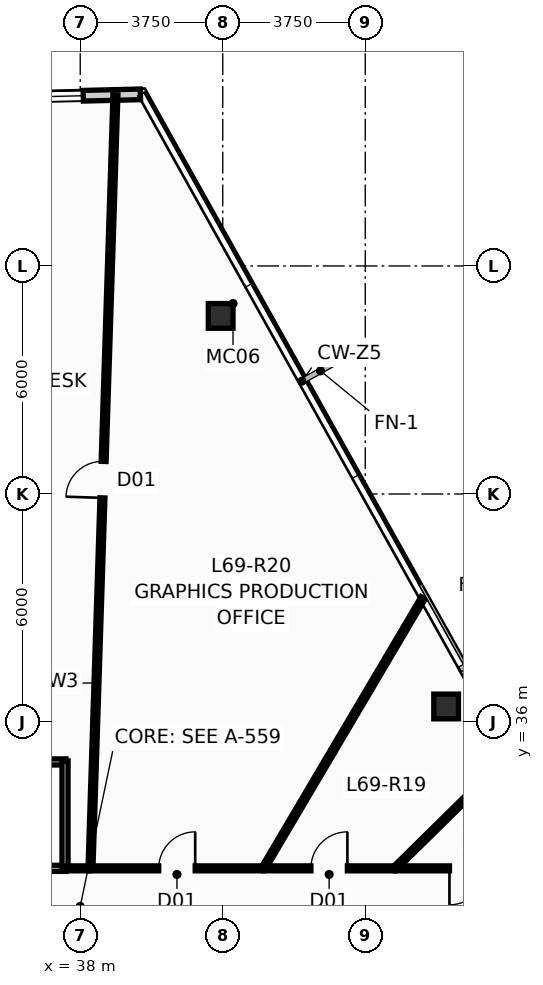
"""IFC4 building model, lengths in metres.
Left out: names, types, materials, properties, quantities, classifications, styles, units other than length and angle.
Written with IfcOpenShell. Run it as: python <this file> out.ifc"""

import sys

from ifc_helpers import new_model, si_unit, direction, frame, frame_2d, origin, origin_2d, place, context, subcontext, project, spatial, rectangle, hollow_rectangle, extrude, source, transform, mapped, element, fill, save


model = new_model("IFC4")
c1 = context("Model", 3, precision=1e-05, world=origin(), true_north=direction((0.0, 1.0)))
c2 = subcontext(c1, "Body", "Model", "MODEL_VIEW")
j1 = project(units=[si_unit("LENGTHUNIT", "METRE"), si_unit("PLANEANGLEUNIT", "RADIAN")], contexts=[c1])
p1 = place(None, origin())
s1 = spatial("IfcSite", under=j1, at=p1, CompositionType="ELEMENT")
p2 = place(p1, origin())
s2 = spatial("IfcBuilding", under=s1, at=p2, CompositionType="ELEMENT")
p3 = place(p2, frame((0.0, 0.0, 262.7)))
s3 = spatial("IfcBuildingStorey", under=s2, at=p3, CompositionType="ELEMENT", Elevation=262.7)
m1 = source(origin(), c2, "Body", "SweptSolid", [
    extrude(hollow_rectangle(XDim=0.65, YDim=0.65, WallThickness=0.04, at=origin_2d()), origin(), (0.0, 0.0, 1.0), 3.651),
])
p4 = place(p3, frame((41.696, 46.686, 0.0), z_axis=(-0.023871161178, 0.00173851594, 0.999713531581), x_axis=(-0.07263675076, -0.997358462359, 0.0)))
e1 = element("IfcColumn", 1, at=p4, inside=s3, PredefinedType="COLUMN", context=c2, shape_type="MappedRepresentation", body=[
    mapped(m1, transform((0.0, 0.0, 0.0), scale=1.0)),
])
m2 = source(origin(), c2, "Body", "SweptSolid", [
    extrude(hollow_rectangle(XDim=0.65, YDim=0.65, WallThickness=0.04, at=origin_2d()), origin(), (0.0, 0.0, 1.0), 3.651),
])
p5 = place(p3, frame((47.628, 36.41, 0.0), z_axis=(-0.01939269685, -0.00601842316, 0.999793829693), x_axis=(0.296399214872, -0.955064136811, 0.0)))
e2 = element("IfcColumn", 2, at=p5, inside=s3, PredefinedType="COLUMN", context=c2, shape_type="MappedRepresentation", body=[
    mapped(m2, transform((0.0, 0.0, 0.0), scale=1.0)),
])
p6 = place(p3, frame((36.27, 52.436, 0.0), z_axis=(0.0, 0.0, 1.0), x_axis=(0.999711728511, 0.024009578864, 0.0)))
e3 = element("IfcWall", 3, at=p6, inside=s3, PredefinedType="STANDARD", context=c2, shape_type="SweptSolid", body=[
    extrude(rectangle(XDim=3.315, YDim=0.28, at=frame_2d((1.657, 0.0))), origin(), (0.0, 0.0, 1.0), 3.4),
])
p7 = place(p6, frame((0.61, 0.0, 0.9)))
e4 = element("IfcOpeningElement", 4, at=p7, cuts=e3, PredefinedType="OPENING", context=c2, shape_type="SweptSolid", body=[
    extrude(rectangle(XDim=1.2, YDim=1.65, at=frame_2d((0.6, 0.825))), frame((0.0, 0.152, 0.0), z_axis=(0.0, -1.0, 0.0), x_axis=(1.0, 0.0, 0.0)), (0.0, 0.0, 1.0), 0.304),
])
p8 = place(p3, frame((34.575, 32.15, 0.0), z_axis=(0.0, 0.0, 1.0), x_axis=(1.0, 0.0, 0.0)))
e5 = element("IfcWall", 5, at=p8, inside=s3, PredefinedType="PLUMBINGWALL", context=c2, shape_type="SweptSolid", body=[
    extrude(rectangle(XDim=3.05, YDim=0.16, at=frame_2d((1.525, 0.0))), origin(), (0.0, 0.0, 1.0), 3.085),
])
p9 = place(p8, frame((1.035, 0.0, 0.0)))
e6 = element("IfcOpeningElement", 6, at=p9, cuts=e5, PredefinedType="OPENING", context=c2, shape_type="SweptSolid", body=[
    extrude(rectangle(XDim=0.92, YDim=2.1, at=frame_2d((0.46, 1.05))), frame((0.0, 0.092, 0.0), z_axis=(0.0, -1.0, 0.0), x_axis=(1.0, 0.0, 0.0)), (0.0, 0.0, 1.0), 0.184),
])
p10 = place(p3, frame((37.625, 34.95, 0.0), z_axis=(0.0, 0.0, 1.0), x_axis=(-1.0, 0.0, 0.0)))
e7 = element("IfcWall", 7, at=p10, inside=s3, PredefinedType="PLUMBINGWALL", context=c2, shape_type="SweptSolid", body=[
    extrude(rectangle(XDim=3.05, YDim=0.16, at=frame_2d((1.525, 0.0))), origin(), (0.0, 0.0, 1.0), 3.085),
])
p11 = place(p3, frame((37.6, 32.125, 0.0), z_axis=(0.0, 0.0, 1.0), x_axis=(0.0, 1.0, 0.0)))
e8 = element("IfcWall", 8, at=p11, inside=s3, PredefinedType="PLUMBINGWALL", context=c2, shape_type="SweptSolid", body=[
    extrude(rectangle(XDim=2.85, YDim=0.16, at=frame_2d((1.425, 0.0))), origin(), (0.0, 0.0, 1.0), 3.4),
])
p12 = place(p3, frame((38.27, 32.155, 0.0), z_axis=(0.0, 0.0, 1.0), x_axis=(0.032268342776, 0.999479241433, 0.0)))
e9 = element("IfcWall", 9, at=p12, inside=s3, PredefinedType="PARTITIONING", context=c2, shape_type="SweptSolid", body=[
    extrude(rectangle(XDim=20.36, YDim=0.13, at=frame_2d((10.18, 0.0))), origin(), (0.0, 0.0, 1.0), 3.4),
])
p13 = place(p12, frame((9.748, 0.0, 0.0)))
e10 = element("IfcOpeningElement", 10, at=p13, cuts=e9, PredefinedType="OPENING", context=c2, shape_type="SweptSolid", body=[
    extrude(rectangle(XDim=0.96, YDim=2.15, at=frame_2d((0.48, 1.075))), frame((0.0, 0.077, 0.0), z_axis=(0.0, -1.0, 0.0), x_axis=(1.0, 0.0, 0.0)), (0.0, 0.0, 1.0), 0.154),
])
p14 = place(p3, frame((42.823, 32.154, 0.0), z_axis=(0.0, 0.0, 1.0), x_axis=(0.508624754374, 0.860988303775, 0.0)))
e11 = element("IfcWall", 11, at=p14, inside=s3, PredefinedType="PARTITIONING", context=c2, shape_type="SweptSolid", body=[
    extrude(rectangle(XDim=8.26, YDim=0.13, at=frame_2d((4.13, 0.0))), origin(), (0.0, 0.0, 1.0), 3.4),
])
p15 = place(p3, frame((38.275, 32.15, 0.0), z_axis=(0.0, 0.0, 1.0), x_axis=(1.0, 0.0, 0.0)))
e12 = element("IfcWall", 12, at=p15, inside=s3, PredefinedType="PARTITIONING", context=c2, shape_type="SweptSolid", body=[
    extrude(rectangle(XDim=4.54, YDim=0.13, at=frame_2d((2.27, 0.0))), origin(), (0.0, 0.0, 1.0), 3.085),
])
p16 = place(p15, frame((1.79, 0.0, 0.0)))
e13 = element("IfcOpeningElement", 13, at=p16, cuts=e12, PredefinedType="OPENING", context=c2, shape_type="SweptSolid", body=[
    extrude(rectangle(XDim=0.96, YDim=2.15, at=frame_2d((0.48, 1.075))), frame((0.0, 0.077, 0.0), z_axis=(0.0, -1.0, 0.0), x_axis=(1.0, 0.0, 0.0)), (0.0, 0.0, 1.0), 0.154),
])
p17 = place(p3, frame((46.284, 32.154, 0.0), z_axis=(0.0, 0.0, 1.0), x_axis=(0.712832058729, 0.70133476746, 0.0)))
e14 = element("IfcWall", 14, at=p17, inside=s3, PredefinedType="PARTITIONING", context=c2, shape_type="SweptSolid", body=[
    extrude(rectangle(XDim=4.268, YDim=0.13, at=frame_2d((2.134, 0.0))), origin(), (0.0, 0.0, 1.0), 3.4),
])
p18 = place(p3, frame((50.976, 32.15, 0.0), z_axis=(0.0, 0.0, 1.0), x_axis=(-1.0, 0.0, 0.0)))
e15 = element("IfcWall", 15, at=p18, inside=s3, PredefinedType="PARTITIONING", context=c2, shape_type="SweptSolid", body=[
    extrude(rectangle(XDim=4.691, YDim=0.13, at=frame_2d((2.345, 0.0))), origin(), (0.0, 0.0, 1.0), 3.4),
])
p19 = place(p18, frame((2.3, 0.0, 0.0)))
e16 = element("IfcOpeningElement", 16, at=p19, cuts=e15, PredefinedType="OPENING", context=c2, shape_type="SweptSolid", body=[
    extrude(rectangle(XDim=0.96, YDim=2.15, at=frame_2d((0.48, 1.075))), frame((0.0, 0.077, 0.0), z_axis=(0.0, -1.0, 0.0), x_axis=(1.0, 0.0, 0.0)), (0.0, 0.0, 1.0), 0.154),
])
p20 = place(p3, frame((42.825, 32.15, 0.0), z_axis=(0.0, 0.0, 1.0), x_axis=(1.0, 0.0, 0.0)))
e17 = element("IfcWall", 17, at=p20, inside=s3, PredefinedType="PARTITIONING", context=c2, shape_type="SweptSolid", body=[
    extrude(rectangle(XDim=3.45, YDim=0.13, at=frame_2d((1.725, 0.0))), origin(), (0.0, 0.0, 1.0), 3.085),
])
p21 = place(p20, frame((1.245, 0.0, 0.0)))
e18 = element("IfcOpeningElement", 18, at=p21, cuts=e17, PredefinedType="OPENING", context=c2, shape_type="SweptSolid", body=[
    extrude(rectangle(XDim=0.96, YDim=2.15, at=frame_2d((0.48, 1.075))), frame((0.0, 0.077, 0.0), z_axis=(0.0, -1.0, 0.0), x_axis=(1.0, 0.0, 0.0)), (0.0, 0.0, 1.0), 0.154),
])
p22 = place(p3, frame((37.605, 32.15, 0.0), z_axis=(0.0, 0.0, 1.0), x_axis=(1.0, 0.0, 0.0)))
e19 = element("IfcWall", 19, at=p22, inside=s3, PredefinedType="PARTITIONING", context=c2, shape_type="SweptSolid", body=[
    extrude(rectangle(XDim=0.66, YDim=0.13, at=frame_2d((0.33, 0.0))), origin(), (0.0, 0.0, 1.0), 3.085),
])
p23 = place(p7, origin())
e20 = element("IfcWindow", 20, at=p23, inside=s3, PartitioningType="SINGLE_PANEL", PredefinedType="WINDOW", context=c2, shape_type="SweptSolid", body=[
    extrude(rectangle(XDim=1.2, YDim=1.65, at=frame_2d((0.6, 0.825))), frame((0.0, 0.03, 0.0), z_axis=(0.0, -1.0, 0.0), x_axis=(1.0, 0.0, 0.0)), (0.0, 0.0, 1.0), 0.06),
])
fill(e4, e20)
p24 = place(p13, origin())
e21 = element("IfcDoor", 21, at=p24, inside=s3, OperationType="SINGLE_SWING_LEFT", PredefinedType="DOOR", context=c2, shape_type="SweptSolid", body=[
    extrude(rectangle(XDim=0.96, YDim=2.15, at=frame_2d((0.48, 1.075))), frame((0.0, 0.025, 0.0), z_axis=(0.0, -1.0, 0.0), x_axis=(1.0, 0.0, 0.0)), (0.0, 0.0, 1.0), 0.05),
])
fill(e10, e21)
p25 = place(p16, origin())
e22 = element("IfcDoor", 22, at=p25, inside=s3, OperationType="SINGLE_SWING_RIGHT", PredefinedType="DOOR", context=c2, shape_type="SweptSolid", body=[
    extrude(rectangle(XDim=0.96, YDim=2.15, at=frame_2d((0.48, 1.075))), frame((0.0, 0.025, 0.0), z_axis=(0.0, -1.0, 0.0), x_axis=(1.0, 0.0, 0.0)), (0.0, 0.0, 1.0), 0.05),
])
fill(e13, e22)
p26 = place(p19, origin())
e23 = element("IfcDoor", 23, at=p26, inside=s3, OperationType="SINGLE_SWING_RIGHT", PredefinedType="DOOR", context=c2, shape_type="SweptSolid", body=[
    extrude(rectangle(XDim=0.96, YDim=2.15, at=frame_2d((0.48, 1.075))), frame((0.0, 0.025, 0.0), z_axis=(0.0, -1.0, 0.0), x_axis=(1.0, 0.0, 0.0)), (0.0, 0.0, 1.0), 0.05),
])
fill(e16, e23)
p27 = place(p21, origin())
e24 = element("IfcDoor", 24, at=p27, inside=s3, OperationType="SINGLE_SWING_RIGHT", PredefinedType="DOOR", context=c2, shape_type="SweptSolid", body=[
    extrude(rectangle(XDim=0.96, YDim=2.15, at=frame_2d((0.48, 1.075))), frame((0.0, 0.025, 0.0), z_axis=(0.0, -1.0, 0.0), x_axis=(1.0, 0.0, 0.0)), (0.0, 0.0, 1.0), 0.05),
])
fill(e18, e24)
save(model, sys.argv[1])
